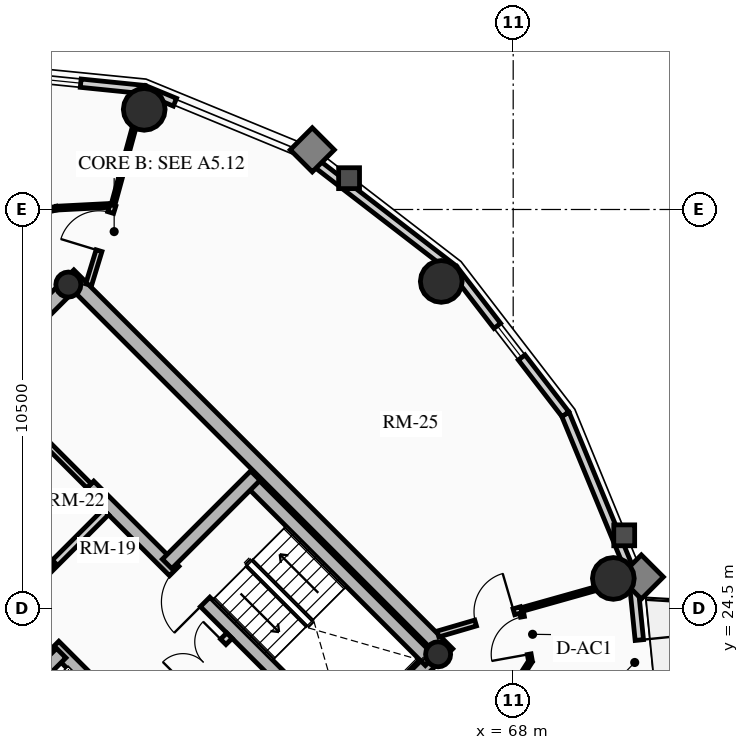
"""IFC4 building model, lengths in metres.
Left out: names, types, materials, properties, quantities, classifications, styles, units other than length and angle.
Written with IfcOpenShell. Run it as: python <this file> out.ifc"""

import sys

from ifc_helpers import new_model, si_unit, direction, frame, frame_2d, origin, origin_2d, place, context, subcontext, project, spatial, rectangle, circle, hollow_circle, extrude, source, transform, mapped, element, fill, save


model = new_model("IFC4")
c1 = context("Model", 3, precision=1e-05, world=origin(), true_north=direction((0.0, 1.0)))
c2 = subcontext(c1, "Body", "Model", "MODEL_VIEW")
j1 = project(units=[si_unit("LENGTHUNIT", "METRE"), si_unit("PLANEANGLEUNIT", "RADIAN")], contexts=[c1])
p1 = place(None, origin())
s1 = spatial("IfcSite", under=j1, at=p1, CompositionType="ELEMENT")
p2 = place(p1, origin())
s2 = spatial("IfcBuilding", under=s1, at=p2, CompositionType="ELEMENT")
p3 = place(p2, frame((0.0, 0.0, 232.45)))
s3 = spatial("IfcBuildingStorey", under=s2, at=p3, CompositionType="ELEMENT", Elevation=232.45)
for number, where, z_axis, x_axis in (
    (1, (58.702, 15.732, 0.0), (0.0, 0.0, 1.0), (-0.707, 0.707, 0.0)),
    (2, (66.268, 23.298, 0.0), (0.0, 0.0, 1.0), (-0.707, 0.707, 0.0)),
):
    element("IfcWall", number, at=place(p3, frame(where, z_axis=z_axis, x_axis=x_axis)), inside=s3, PredefinedType="SHEAR", context=c2, shape_type="SweptSolid", body=[
        extrude(rectangle(XDim=14.1, YDim=0.4, at=frame_2d((7.05, 0.0))), origin(), (0.0, 0.0, 1.0), 3.2),
    ])
p4 = place(p3, frame((58.561, 15.873, 0.0), z_axis=(0.0, 0.0, 1.0), x_axis=(0.707106781187, 0.707106781187, 0.0)))
e3 = element("IfcWall", 3, at=p4, inside=s3, PredefinedType="SHEAR", context=c2, shape_type="SweptSolid", body=[
    extrude(rectangle(XDim=10.7, YDim=0.4, at=frame_2d((5.35, 0.0))), origin(), (0.0, 0.0, 1.0), 3.2),
])
m1 = source(origin(), c2, "Body", "SweptSolid", [
    extrude(rectangle(XDim=1.5, YDim=2.02, at=frame_2d((0.75, 1.01))), frame((0.0, 0.21, 0.0), z_axis=(0.0, -1.0, 0.0), x_axis=(1.0, 0.0, 0.0)), (0.0, 0.0, 1.0), 0.42),
])
p5 = place(p4, frame((5.45, 0.0, 0.0)))
e4 = element("IfcOpeningElement", 4, at=p5, cuts=e3, PredefinedType="OPENING", context=c2, shape_type="MappedRepresentation", body=[
    mapped(m1, transform((0.0, 0.0, 0.0), x_axis=(1.0, 0.0, 0.0), y_axis=(0.0, 1.0, 0.0), z_axis=(0.0, 0.0, 1.0), scale=1.0)),
])
p6 = place(p3, frame((48.873, 25.561, 0.0), z_axis=(0.0, 0.0, 1.0), x_axis=(0.707106781187, 0.707106781187, 0.0)))
e5 = element("IfcWall", 5, at=p6, inside=s3, PredefinedType="SHEAR", context=c2, shape_type="SweptSolid", body=[
    extrude(rectangle(XDim=10.7, YDim=0.4, at=frame_2d((5.35, 0.0))), origin(), (0.0, 0.0, 1.0), 3.2),
])
p7 = place(p6, frame((4.6, 0.0, 0.0)))
e6 = element("IfcOpeningElement", 6, at=p7, cuts=e5, PredefinedType="OPENING", context=c2, shape_type="MappedRepresentation", body=[
    mapped(m1, transform((0.0, 0.0, 0.0), x_axis=(1.0, 0.0, 0.0), y_axis=(0.0, 1.0, 0.0), z_axis=(0.0, 0.0, 1.0), scale=1.0)),
])
p8 = place(p3, frame((61.06, 18.373, 0.0), z_axis=(0.0, 0.0, 1.0), x_axis=(-0.707106781187, 0.707106781187, 0.0)))
e7 = element("IfcWall", 7, at=p8, inside=s3, PredefinedType="SHEAR", context=c2, shape_type="SweptSolid", body=[
    extrude(rectangle(XDim=13.7, YDim=0.35, at=frame_2d((6.85, 0.0))), origin(), (0.0, 0.0, 1.0), 3.2),
])
m2 = source(origin(), c2, "Body", "SweptSolid", [
    extrude(rectangle(XDim=1.1, YDim=2.015, at=frame_2d((0.55, 1.007))), frame((0.0, 0.185, 0.0), z_axis=(0.0, -1.0, 0.0), x_axis=(1.0, 0.0, 0.0)), (0.0, 0.0, 1.0), 0.37),
])
p9 = place(p8, frame((4.85, 0.0, 0.0)))
e8 = element("IfcOpeningElement", 8, at=p9, cuts=e7, PredefinedType="OPENING", context=c2, shape_type="MappedRepresentation", body=[
    mapped(m2, transform((0.0, 0.0, 0.0), x_axis=(1.0, 0.0, 0.0), y_axis=(0.0, 1.0, 0.0), z_axis=(0.0, 0.0, 1.0), scale=1.0)),
])
p10 = place(p8, frame((0.625, 0.0, 0.0)))
e9 = element("IfcOpeningElement", 9, at=p10, cuts=e7, PredefinedType="OPENING", context=c2, shape_type="MappedRepresentation", body=[
    mapped(m2, transform((0.0, 0.0, 0.0), x_axis=(1.0, 0.0, 0.0), y_axis=(0.0, 1.0, 0.0), z_axis=(0.0, 0.0, 1.0), scale=1.0)),
])
p11 = place(p8, frame((2.625, 0.0, 0.0)))
e10 = element("IfcOpeningElement", 10, at=p11, cuts=e7, PredefinedType="OPENING", context=c2, shape_type="MappedRepresentation", body=[
    mapped(m2, transform((0.0, 0.0, 0.0), x_axis=(1.0, 0.0, 0.0), y_axis=(0.0, 1.0, 0.0), z_axis=(0.0, 0.0, 1.0), scale=1.0)),
])
m3 = source(origin(), c2, "Body", "SweptSolid", [
    extrude(rectangle(XDim=1.15, YDim=2.02, at=frame_2d((0.575, 1.01))), frame((0.0, 0.185, 0.0), z_axis=(0.0, -1.0, 0.0), x_axis=(1.0, 0.0, 0.0)), (0.0, 0.0, 1.0), 0.37),
])
p12 = place(p8, frame((7.27, 0.0, 0.0)))
e11 = element("IfcOpeningElement", 11, at=p12, cuts=e7, PredefinedType="OPENING", context=c2, shape_type="MappedRepresentation", body=[
    mapped(m3, transform((0.0, 0.0, 0.0), x_axis=(1.0, 0.0, 0.0), y_axis=(0.0, 1.0, 0.0), z_axis=(0.0, 0.0, 1.0), scale=1.0)),
])
p13 = place(p3, frame((63.627, 20.94, 0.0), z_axis=(0.0, 0.0, 1.0), x_axis=(-0.707119496762, 0.707094065383, 0.0)))
e12 = element("IfcWall", 12, at=p13, inside=s3, PredefinedType="SHEAR", context=c2, shape_type="SweptSolid", body=[
    extrude(rectangle(XDim=9.6, YDim=0.35, at=frame_2d((4.8, 0.0))), origin(), (0.0, 0.0, 1.0), 3.2),
])
p14 = place(p13, frame((5.28, 0.0, 0.0)))
e13 = element("IfcOpeningElement", 13, at=p14, cuts=e12, PredefinedType="OPENING", context=c2, shape_type="MappedRepresentation", body=[
    mapped(m3, transform((0.0, 0.0, 0.0), x_axis=(1.0, 0.0, 0.0), y_axis=(0.0, 1.0, 0.0), z_axis=(0.0, 0.0, 1.0), scale=1.0)),
])
p15 = place(p3, frame((53.784, 21.003, 0.0), z_axis=(0.0, 0.0, 1.0), x_axis=(0.707106781187, 0.707106781187, 0.0)))
e14 = element("IfcWall", 14, at=p15, inside=s3, PredefinedType="SHEAR", context=c2, shape_type="SweptSolid", body=[
    extrude(rectangle(XDim=3.285, YDim=0.35, at=frame_2d((1.643, 0.0))), origin(), (0.0, 0.0, 1.0), 3.2),
])
p16 = place(p3, frame((65.812, 23.125, 0.0), z_axis=(0.0, 0.0, 1.0), x_axis=(-0.707106781187, 0.707106781187, 0.0)))
e15 = element("IfcWall", 15, at=p16, inside=s3, PredefinedType="SHEAR", context=c2, shape_type="SweptSolid", body=[
    extrude(rectangle(XDim=6.695, YDim=0.35, at=frame_2d((3.348, 0.0))), origin(), (0.0, 0.0, 1.0), 3.2),
])
p17 = place(p3, frame((58.893, 25.674, 0.0), z_axis=(0.0, 0.0, 1.0), x_axis=(0.707106781187, 0.707106781187, 0.0)))
e16 = element("IfcWall", 16, at=p17, inside=s3, PredefinedType="SHEAR", context=c2, shape_type="SweptSolid", body=[
    extrude(rectangle(XDim=3.285, YDim=0.35, at=frame_2d((1.643, 0.0))), origin(), (0.0, 0.0, 1.0), 3.2),
])
for number, where, z_axis, x_axis in (
    (17, (66.024, 23.294, 0.0), (0.0, 0.0, 1.0), (0.707, 0.707, 0.0)),
    (18, (56.294, 33.024, 0.0), (0.0, 0.0, 1.0), (0.707, 0.707, 0.0)),
):
    element("IfcColumn", number, at=place(p3, frame(where, z_axis=z_axis, x_axis=x_axis)), inside=s3, PredefinedType="COLUMN", context=c2, shape_type="SweptSolid", body=[
        extrude(hollow_circle(Radius=0.33, WallThickness=0.025, at=origin_2d()), origin(), (0.0, 0.0, 1.0), 3.2),
    ])
for number, where, z_axis, x_axis in (
    (19, (66.107, 33.107, 0.0), (0.0, 0.0, 1.0), (1.0, 0.0, 0.0)),
    (20, (58.291, 37.635, 0.0), (0.0, 0.0, 1.0), (1.0, 0.0, 0.0)),
    (21, (70.635, 25.291, 0.0), (0.0, 0.0, 1.0), (1.0, 0.0, 0.0)),
):
    element("IfcColumn", number, at=place(p3, frame(where, z_axis=z_axis, x_axis=x_axis)), inside=s3, PredefinedType="USERDEFINED", context=c2, shape_type="SweptSolid", body=[
        extrude(circle(Radius=0.55, at=origin_2d()), origin(), (0.0, 0.0, 1.0), 3.2),
    ])
p18 = place(p3, frame((62.613, 36.374, 0.0), z_axis=(0.0, 0.0, 1.0), x_axis=(0.791998462147, -0.610523083886, 0.0)))
e22 = element("IfcWall", 22, at=p18, inside=s3, PredefinedType="SOLIDWALL", context=c2, shape_type="SweptSolid", body=[
    extrude(rectangle(XDim=4.82, YDim=0.22, at=frame_2d((2.41, 0.0))), origin(), (0.0, 0.0, 1.0), 2.402),
])
p19 = place(p3, frame((58.295, 38.155, 0.0), z_axis=(0.0, 0.0, 1.0), x_axis=(0.924515260676, -0.381145028536, 0.0)))
e23 = element("IfcWall", 23, at=p19, inside=s3, PredefinedType="SOLIDWALL", context=c2, shape_type="SweptSolid", body=[
    extrude(rectangle(XDim=0.87, YDim=0.22, at=frame_2d((0.435, 0.0))), origin(), (0.0, 0.0, 1.0), 2.402),
])
p20 = place(p3, frame((53.9, 38.599, 0.0), z_axis=(0.0, 0.0, 1.0), x_axis=(0.994929930991, -0.100570534541, 0.0)))
e24 = element("IfcWall", 24, at=p20, inside=s3, PredefinedType="SOLIDWALL", context=c2, shape_type="SweptSolid", body=[
    extrude(rectangle(XDim=4.418, YDim=0.22, at=frame_2d((2.209, 0.0))), origin(), (0.0, 0.0, 1.0), 2.402),
])
m4 = source(origin(), c2, "Body", "SweptSolid", [
    extrude(rectangle(XDim=1.05, YDim=1.3, at=frame_2d((0.525, 0.65))), frame((0.0, 0.12, 0.0), z_axis=(0.0, -1.0, 0.0), x_axis=(1.0, 0.0, 0.0)), (0.0, 0.0, 1.0), 0.24),
])
p21 = place(p20, frame((1.684, 0.0, 0.65)))
e25 = element("IfcOpeningElement", 25, at=p21, cuts=e24, PredefinedType="OPENING", context=c2, shape_type="MappedRepresentation", body=[
    mapped(m4, transform((0.0, 0.0, 0.0), x_axis=(1.0, 0.0, 0.0), y_axis=(0.0, 1.0, 0.0), z_axis=(0.0, 0.0, 1.0), scale=1.0)),
])
p22 = place(p3, frame((71.155, 25.295, 0.0), z_axis=(0.0, 0.0, 1.0), x_axis=(0.100570534541, -0.994929930991, 0.0)))
e26 = element("IfcWall", 26, at=p22, inside=s3, PredefinedType="SOLIDWALL", context=c2, shape_type="SweptSolid", body=[
    extrude(rectangle(XDim=4.418, YDim=0.22, at=frame_2d((2.209, 0.0))), origin(), (0.0, 0.0, 1.0), 2.402),
])
m5 = source(origin(), c2, "Body", "SweptSolid", [
    extrude(rectangle(XDim=1.15, YDim=2.005, at=frame_2d((0.575, 1.002))), frame((0.0, 0.12, 0.0), z_axis=(0.0, -1.0, 0.0), x_axis=(1.0, 0.0, 0.0)), (0.0, 0.0, 1.0), 0.24),
])
p23 = place(p22, frame((1.634, 0.0, 0.0)))
e27 = element("IfcOpeningElement", 27, at=p23, cuts=e26, PredefinedType="OPENING", context=c2, shape_type="MappedRepresentation", body=[
    mapped(m5, transform((0.0, 0.0, 0.0), x_axis=(1.0, 0.0, 0.0), y_axis=(0.0, 1.0, 0.0), z_axis=(0.0, 0.0, 1.0), scale=1.0)),
])
p24 = place(p3, frame((69.374, 29.613, 0.0), z_axis=(0.0, 0.0, 1.0), x_axis=(0.381309704956, -0.924447353237, 0.0)))
e28 = element("IfcWall", 28, at=p24, inside=s3, PredefinedType="SOLIDWALL", context=c2, shape_type="SweptSolid", body=[
    extrude(rectangle(XDim=4.671, YDim=0.22, at=frame_2d((2.335, 0.0))), origin(), (0.0, 0.0, 1.0), 2.402),
])
p25 = place(p3, frame((66.431, 33.431, 0.0), z_axis=(0.0, 0.0, 1.0), x_axis=(0.610523083886, -0.791998462147, 0.0)))
e29 = element("IfcWall", 29, at=p25, inside=s3, PredefinedType="SOLIDWALL", context=c2, shape_type="SweptSolid", body=[
    extrude(rectangle(XDim=4.82, YDim=0.22, at=frame_2d((2.41, 0.0))), origin(), (0.0, 0.0, 1.0), 2.402),
])
p26 = place(p25, frame((1.885, 0.0, 0.65)))
e30 = element("IfcOpeningElement", 30, at=p26, cuts=e29, PredefinedType="OPENING", context=c2, shape_type="MappedRepresentation", body=[
    mapped(m4, transform((0.0, 0.0, 0.0), x_axis=(1.0, 0.0, 0.0), y_axis=(0.0, 1.0, 0.0), z_axis=(0.0, 0.0, 1.0), scale=1.0)),
])
p27 = place(p3, frame((58.214, 21.467, 0.0), z_axis=(0.0, 0.0, 1.0), x_axis=(0.707106781187, 0.707106781187, 0.0)))
e31 = element("IfcWall", 31, at=p27, inside=s3, PredefinedType="PARTITIONING", context=c2, shape_type="SweptSolid", body=[
    extrude(rectangle(XDim=3.28, YDim=0.2, at=frame_2d((1.64, 0.0))), origin(), (0.0, 0.0, 1.0), 2.765),
])
m6 = source(origin(), c2, "Body", "SweptSolid", [
    extrude(rectangle(XDim=1.5, YDim=2.02, at=frame_2d((0.75, 1.01))), frame((0.0, 0.11, 0.0), z_axis=(0.0, -1.0, 0.0), x_axis=(1.0, 0.0, 0.0)), (0.0, 0.0, 1.0), 0.22),
])
p28 = place(p27, frame((1.55, 0.0, 0.0)))
e32 = element("IfcOpeningElement", 32, at=p28, cuts=e31, PredefinedType="OPENING", context=c2, shape_type="MappedRepresentation", body=[
    mapped(m6, transform((0.0, 0.0, 0.0), x_axis=(1.0, 0.0, 0.0), y_axis=(0.0, 1.0, 0.0), z_axis=(0.0, 0.0, 1.0), scale=1.0)),
])
p29 = place(p3, frame((54.961, 24.719, 0.0), z_axis=(0.0, 0.0, 1.0), x_axis=(0.707106781187, 0.707106781187, 0.0)))
e33 = element("IfcWall", 33, at=p29, inside=s3, PredefinedType="PARTITIONING", context=c2, shape_type="SweptSolid", body=[
    extrude(rectangle(XDim=3.28, YDim=0.2, at=frame_2d((1.64, 0.0))), origin(), (0.0, 0.0, 1.0), 2.765),
])
m7 = source(origin(), c2, "Body", "SweptSolid", [
    extrude(rectangle(XDim=0.9, YDim=2.005, at=frame_2d((0.45, 1.002))), frame((0.0, 0.11, 0.0), z_axis=(0.0, -1.0, 0.0), x_axis=(1.0, 0.0, 0.0)), (0.0, 0.0, 1.0), 0.22),
])
p30 = place(p29, frame((0.16, 0.0, 0.0)))
e34 = element("IfcOpeningElement", 34, at=p30, cuts=e33, PredefinedType="OPENING", context=c2, shape_type="MappedRepresentation", body=[
    mapped(m7, transform((0.0, 0.0, 0.0), x_axis=(1.0, 0.0, 0.0), y_axis=(0.0, 1.0, 0.0), z_axis=(0.0, 0.0, 1.0), scale=1.0)),
])
p31 = place(p3, frame((55.874, 25.631, 0.0), z_axis=(0.0, 0.0, 1.0), x_axis=(-0.707157639372, 0.707055919343, 0.0)))
e35 = element("IfcWall", 35, at=p31, inside=s3, PredefinedType="PARTITIONING", context=c2, shape_type="SweptSolid", body=[
    extrude(rectangle(XDim=2.4, YDim=0.2, at=frame_2d((1.2, 0.0))), origin(), (0.0, 0.0, 1.0), 2.765),
])
p32 = place(p3, frame((56.839, 27.728, 0.0), z_axis=(0.0, 0.0, 1.0), x_axis=(-0.707106781187, 0.707106781187, 0.0)))
e36 = element("IfcWall", 36, at=p32, inside=s3, PredefinedType="PARTITIONING", context=c2, shape_type="SweptSolid", body=[
    extrude(rectangle(XDim=3.9, YDim=0.16, at=frame_2d((1.95, 0.0))), origin(), (0.0, 0.0, 1.0), 2.765),
])
m8 = source(origin(), c2, "Body", "SweptSolid", [
    extrude(rectangle(XDim=0.9, YDim=2.005, at=frame_2d((0.45, 1.002))), frame((0.0, 0.09, 0.0), z_axis=(0.0, -1.0, 0.0), x_axis=(1.0, 0.0, 0.0)), (0.0, 0.0, 1.0), 0.18),
])
p33 = place(p32, frame((2.2, 0.0, 0.0)))
e37 = element("IfcOpeningElement", 37, at=p33, cuts=e36, PredefinedType="OPENING", context=c2, shape_type="MappedRepresentation", body=[
    mapped(m8, transform((0.0, 0.0, 0.0), x_axis=(1.0, 0.0, 0.0), y_axis=(0.0, 1.0, 0.0), z_axis=(0.0, 0.0, 1.0), scale=1.0)),
])
p34 = place(p3, frame((57.467, 35.111, 0.0), z_axis=(0.0, 0.0, 1.0), x_axis=(-0.998691757323, -0.051134859488, 0.0)))
e38 = element("IfcWall", 38, at=p34, inside=s3, PredefinedType="MOVABLE", context=c2, shape_type="SweptSolid", body=[
    extrude(rectangle(XDim=1.485, YDim=0.1, at=frame_2d((0.742, 0.0))), origin(), (0.0, 0.0, 1.0), 2.402),
])
p35 = place(p3, frame((55.984, 35.035, 0.0), z_axis=(0.0, 0.0, 1.0), x_axis=(-0.975290305708, -0.22092718165, 0.0)))
e39 = element("IfcWall", 39, at=p35, inside=s3, PredefinedType="MOVABLE", context=c2, shape_type="SweptSolid", body=[
    extrude(rectangle(XDim=1.597, YDim=0.1, at=frame_2d((0.798, 0.0))), origin(), (0.0, 0.0, 1.0), 2.335),
])
m9 = source(origin(), c2, "Body", "SweptSolid", [
    extrude(rectangle(XDim=1.05, YDim=2.015, at=frame_2d((0.525, 1.007))), frame((0.0, 0.06, 0.0), z_axis=(0.0, -1.0, 0.0), x_axis=(1.0, 0.0, 0.0)), (0.0, 0.0, 1.0), 0.12),
])
p36 = place(p35, frame((0.427, 0.0, 0.0)))
e40 = element("IfcOpeningElement", 40, at=p36, cuts=e39, PredefinedType="OPENING", context=c2, shape_type="MappedRepresentation", body=[
    mapped(m9, transform((0.0, 0.0, 0.0), x_axis=(1.0, 0.0, 0.0), y_axis=(0.0, 1.0, 0.0), z_axis=(0.0, 0.0, 1.0), scale=1.0)),
])
p37 = place(p3, frame((67.435, 21.521, 0.0), z_axis=(0.0, 0.0, 1.0), x_axis=(0.540777197838, 0.841165870859, 0.0)))
e41 = element("IfcWall", 41, at=p37, inside=s3, PredefinedType="MOVABLE", context=c2, shape_type="SweptSolid", body=[
    extrude(rectangle(XDim=1.888, YDim=0.1, at=frame_2d((0.944, 0.0))), origin(), (0.0, 0.0, 1.0), 2.335),
])
p38 = place(p3, frame((68.456, 23.11, 0.0), z_axis=(0.0, 0.0, 1.0), x_axis=(-0.1772522795, 0.984165448191, 0.0)))
e42 = element("IfcWall", 42, at=p38, inside=s3, PredefinedType="MOVABLE", context=c2, shape_type="SweptSolid", body=[
    extrude(rectangle(XDim=1.382, YDim=0.1, at=frame_2d((0.691, 0.0))), origin(), (0.0, 0.0, 1.0), 2.402),
])
m10 = source(origin(), c2, "Body", "SweptSolid", [
    extrude(rectangle(XDim=1.0, YDim=2.015, at=frame_2d((0.5, 1.007))), frame((0.0, 0.06, 0.0), z_axis=(0.0, -1.0, 0.0), x_axis=(1.0, 0.0, 0.0)), (0.0, 0.0, 1.0), 0.12),
])
p39 = place(p38, frame((0.191, 0.0, 0.0)))
e43 = element("IfcOpeningElement", 43, at=p39, cuts=e42, PredefinedType="OPENING", context=c2, shape_type="MappedRepresentation", body=[
    mapped(m10, transform((0.0, 0.0, 0.0), x_axis=(1.0, 0.0, 0.0), y_axis=(0.0, 1.0, 0.0), z_axis=(0.0, 0.0, 1.0), scale=1.0)),
])
p40 = place(p3, frame((57.467, 35.111, 0.0), z_axis=(0.0, 0.0, 1.0), x_axis=(0.263354670488, 0.964699081337, 0.0)))
e44 = element("IfcWall", 44, at=p40, inside=s3, PredefinedType="MOVABLE", context=c2, shape_type="SweptSolid", body=[
    extrude(rectangle(XDim=3.134, YDim=0.1, at=frame_2d((1.567, 0.0))), origin(), (0.0, 0.0, 1.0), 2.402),
])
p41 = place(p3, frame((68.211, 24.469, 0.0), z_axis=(0.0, 0.0, 1.0), x_axis=(0.962605107736, 0.270908483735, 0.0)))
e45 = element("IfcWall", 45, at=p41, inside=s3, PredefinedType="MOVABLE", context=c2, shape_type="SweptSolid", body=[
    extrude(rectangle(XDim=3.038, YDim=0.1, at=frame_2d((1.519, 0.0))), origin(), (0.0, 0.0, 1.0), 2.402),
])
p42 = place(p3, frame((56.828, 33.021, 0.0), z_axis=(0.0, 0.0, 1.0), x_axis=(0.292139093972, 0.956375841274, 0.0)))
e46 = element("IfcWall", 46, at=p42, inside=s3, PredefinedType="PARTITIONING", context=c2, shape_type="SweptSolid", body=[
    extrude(rectangle(XDim=2.186, YDim=0.16, at=frame_2d((1.093, 0.0))), origin(), (0.0, 0.0, 1.0), 2.335),
])
m11 = source(origin(), c2, "Body", "SweptSolid", [
    extrude(rectangle(XDim=1.05, YDim=2.015, at=frame_2d((0.525, 1.007))), frame((0.0, 0.09, 0.0), z_axis=(0.0, -1.0, 0.0), x_axis=(1.0, 0.0, 0.0)), (0.0, 0.0, 1.0), 0.18),
])
p43 = place(p42, frame((0.936, 0.0, 0.0)))
e47 = element("IfcOpeningElement", 47, at=p43, cuts=e46, PredefinedType="OPENING", context=c2, shape_type="MappedRepresentation", body=[
    mapped(m11, transform((0.0, 0.0, 0.0), x_axis=(1.0, 0.0, 0.0), y_axis=(0.0, 1.0, 0.0), z_axis=(0.0, 0.0, 1.0), scale=1.0)),
])
p44 = place(p3, frame((66.021, 23.828, 0.0), z_axis=(0.0, 0.0, 1.0), x_axis=(0.959727558294, 0.280932400856, 0.0)))
e48 = element("IfcWall", 48, at=p44, inside=s3, PredefinedType="PARTITIONING", context=c2, shape_type="SweptSolid", body=[
    extrude(rectangle(XDim=2.282, YDim=0.16, at=frame_2d((1.141, 0.0))), origin(), (0.0, 0.0, 1.0), 2.335),
])
p45 = place(p44, frame((1.032, 0.0, 0.0)))
e49 = element("IfcOpeningElement", 49, at=p45, cuts=e48, PredefinedType="OPENING", context=c2, shape_type="MappedRepresentation", body=[
    mapped(m11, transform((0.0, 0.0, 0.0), x_axis=(1.0, 0.0, 0.0), y_axis=(0.0, 1.0, 0.0), z_axis=(0.0, 0.0, 1.0), scale=1.0)),
])
m12 = source(origin(), c2, "Body", "SweptSolid", [
    extrude(rectangle(XDim=1.05, YDim=1.3, at=frame_2d((0.525, 0.65))), frame((0.0, 0.03, 0.0), z_axis=(0.0, -1.0, 0.0), x_axis=(1.0, 0.0, 0.0)), (0.0, 0.0, 1.0), 0.06),
])
p46 = place(p21, origin())
e50 = element("IfcWindow", 50, at=p46, inside=s3, PartitioningType="SINGLE_PANEL", PredefinedType="WINDOW", context=c2, shape_type="MappedRepresentation", body=[
    mapped(m12, transform((0.0, 0.0, 0.0), x_axis=(1.0, 0.0, 0.0), y_axis=(0.0, 1.0, 0.0), z_axis=(0.0, 0.0, 1.0), scale=1.0)),
])
fill(e25, e50)
m13 = source(origin(), c2, "Body", "SweptSolid", [
    extrude(rectangle(XDim=1.15, YDim=2.005, at=frame_2d((0.575, 1.002))), frame((0.0, 0.025, 0.0), z_axis=(0.0, -1.0, 0.0), x_axis=(1.0, 0.0, 0.0)), (0.0, 0.0, 1.0), 0.05),
])
p47 = place(p23, origin())
e51 = element("IfcDoor", 51, at=p47, inside=s3, OperationType="SINGLE_SWING_LEFT", PredefinedType="DOOR", context=c2, shape_type="MappedRepresentation", body=[
    mapped(m13, transform((0.0, 0.0, 0.0), x_axis=(1.0, 0.0, 0.0), y_axis=(0.0, 1.0, 0.0), z_axis=(0.0, 0.0, 1.0), scale=1.0)),
])
fill(e27, e51)
p48 = place(p26, origin())
e52 = element("IfcWindow", 52, at=p48, inside=s3, PartitioningType="SINGLE_PANEL", PredefinedType="WINDOW", context=c2, shape_type="MappedRepresentation", body=[
    mapped(m12, transform((0.0, 0.0, 0.0), x_axis=(1.0, 0.0, 0.0), y_axis=(0.0, 1.0, 0.0), z_axis=(0.0, 0.0, 1.0), scale=1.0)),
])
fill(e30, e52)
m14 = source(origin(), c2, "Body", "SweptSolid", [
    extrude(rectangle(XDim=1.15, YDim=2.02, at=frame_2d((0.575, 1.01))), frame((0.0, 0.025, 0.0), z_axis=(0.0, -1.0, 0.0), x_axis=(1.0, 0.0, 0.0)), (0.0, 0.0, 1.0), 0.05),
])
p49 = place(p12, origin())
e53 = element("IfcDoor", 53, at=p49, inside=s3, OperationType="SINGLE_SWING_RIGHT", PredefinedType="DOOR", context=c2, shape_type="MappedRepresentation", body=[
    mapped(m14, transform((0.0, 0.0, 0.0), x_axis=(1.0, 0.0, 0.0), y_axis=(0.0, 1.0, 0.0), z_axis=(0.0, 0.0, 1.0), scale=1.0)),
])
fill(e11, e53)
p50 = place(p14, origin())
e54 = element("IfcDoor", 54, at=p50, inside=s3, OperationType="SINGLE_SWING_LEFT", PredefinedType="DOOR", context=c2, shape_type="MappedRepresentation", body=[
    mapped(m14, transform((0.0, 0.0, 0.0), x_axis=(1.0, 0.0, 0.0), y_axis=(0.0, 1.0, 0.0), z_axis=(0.0, 0.0, 1.0), scale=1.0)),
])
fill(e13, e54)
m15 = source(origin(), c2, "Body", "SweptSolid", [
    extrude(rectangle(XDim=1.5, YDim=2.02, at=frame_2d((0.75, 1.01))), frame((0.0, 0.025, 0.0), z_axis=(0.0, -1.0, 0.0), x_axis=(1.0, 0.0, 0.0)), (0.0, 0.0, 1.0), 0.05),
])
p51 = place(p28, origin())
e55 = element("IfcDoor", 55, at=p51, inside=s3, OperationType="DOUBLE_DOOR_SINGLE_SWING", PredefinedType="DOOR", context=c2, shape_type="MappedRepresentation", body=[
    mapped(m15, transform((0.0, 0.0, 0.0), x_axis=(1.0, 0.0, 0.0), y_axis=(0.0, 1.0, 0.0), z_axis=(0.0, 0.0, 1.0), scale=1.0)),
])
fill(e32, e55)
m16 = source(origin(), c2, "Body", "SweptSolid", [
    extrude(rectangle(XDim=1.05, YDim=2.015, at=frame_2d((0.525, 1.007))), frame((0.0, 0.025, 0.0), z_axis=(0.0, -1.0, 0.0), x_axis=(1.0, 0.0, 0.0)), (0.0, 0.0, 1.0), 0.05),
])
p52 = place(p43, origin())
e56 = element("IfcDoor", 56, at=p52, inside=s3, OperationType="SINGLE_SWING_LEFT", PredefinedType="DOOR", context=c2, shape_type="MappedRepresentation", body=[
    mapped(m16, transform((0.0, 0.0, 0.0), x_axis=(1.0, 0.0, 0.0), y_axis=(0.0, 1.0, 0.0), z_axis=(0.0, 0.0, 1.0), scale=1.0)),
])
fill(e47, e56)
p53 = place(p45, origin())
e57 = element("IfcDoor", 57, at=p53, inside=s3, OperationType="SINGLE_SWING_RIGHT", PredefinedType="DOOR", context=c2, shape_type="MappedRepresentation", body=[
    mapped(m16, transform((0.0, 0.0, 0.0), x_axis=(1.0, 0.0, 0.0), y_axis=(0.0, 1.0, 0.0), z_axis=(0.0, 0.0, 1.0), scale=1.0)),
])
fill(e49, e57)
m17 = source(origin(), c2, "Body", "SweptSolid", [
    extrude(rectangle(XDim=1.0, YDim=2.015, at=frame_2d((0.5, 1.007))), frame((0.0, 0.025, 0.0), z_axis=(0.0, -1.0, 0.0), x_axis=(1.0, 0.0, 0.0)), (0.0, 0.0, 1.0), 0.05),
])
p54 = place(p39, origin())
e58 = element("IfcDoor", 58, at=p54, inside=s3, OperationType="SINGLE_SWING_LEFT", PredefinedType="DOOR", context=c2, shape_type="MappedRepresentation", body=[
    mapped(m17, transform((0.0, 0.0, 0.0), x_axis=(1.0, 0.0, 0.0), y_axis=(0.0, 1.0, 0.0), z_axis=(0.0, 0.0, 1.0), scale=1.0)),
])
fill(e43, e58)
save(model, sys.argv[1])
